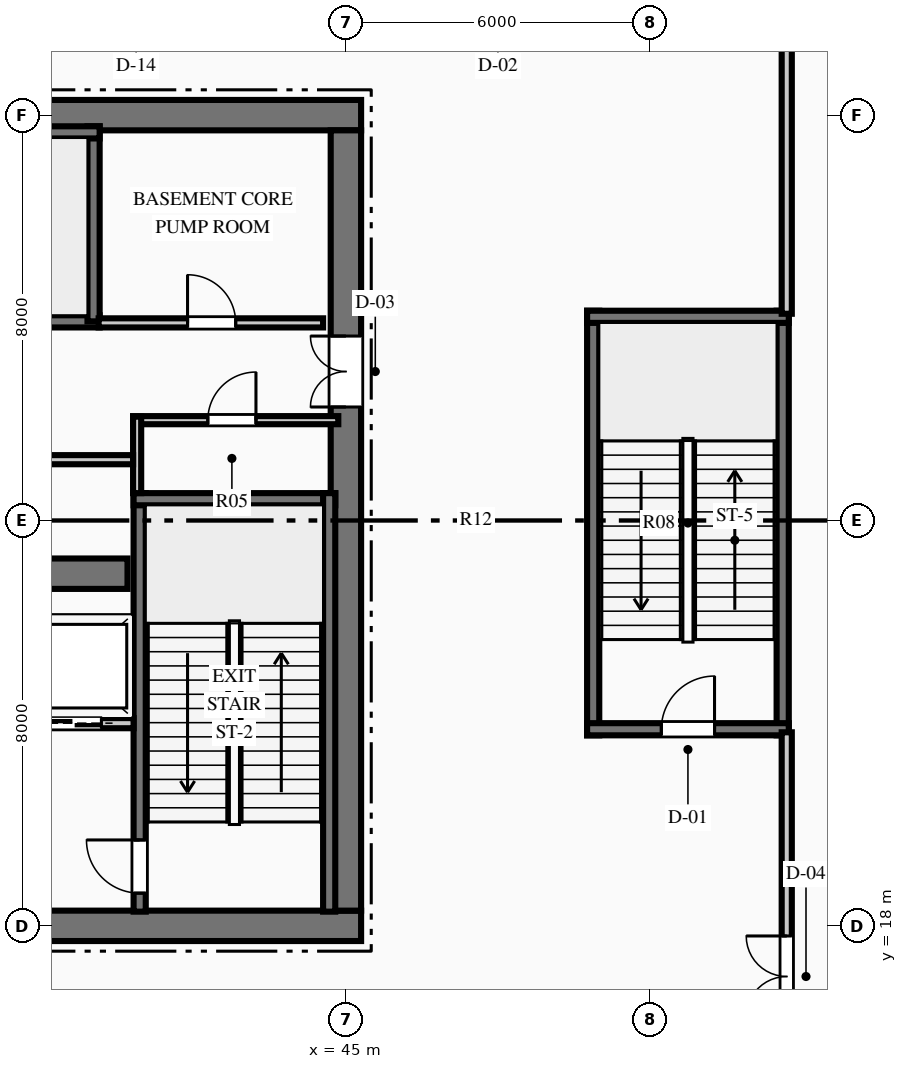
"""IFC4 building model, lengths in metres.
Left out: names, types, materials, properties, quantities, classifications, styles, units other than length and angle.
Written with IfcOpenShell. Run it as: python <this file> out.ifc"""

import sys

from ifc_helpers import new_model, si_unit, direction, frame, frame_2d, origin, place, context, subcontext, project, spatial, rectangle, extrude, element, fill, save


model = new_model("IFC4")
c1 = context("Model", 3, precision=1e-05, world=origin(), true_north=direction((0.0, 1.0)))
c2 = subcontext(c1, "Body", "Model", "MODEL_VIEW")
j1 = project(units=[si_unit("LENGTHUNIT", "METRE"), si_unit("PLANEANGLEUNIT", "RADIAN")], contexts=[c1])
p1 = place(None, origin())
s1 = spatial("IfcSite", under=j1, at=p1, CompositionType="ELEMENT")
p2 = place(p1, origin())
s2 = spatial("IfcBuilding", under=s1, at=p2, CompositionType="ELEMENT")
p3 = place(p2, frame((0.0, 0.0, -5.2)))
s3 = spatial("IfcBuildingStorey", under=s2, at=p3, CompositionType="ELEMENT", Elevation=-5.2)
p4 = place(p3, frame((26.7, 18.0, -0.3), z_axis=(0.0, 0.0, 1.0), x_axis=(1.0, 0.0, 0.0)))
e1 = element("IfcWall", 1, at=p4, inside=s3, PredefinedType="SHEAR", context=c2, shape_type="SweptSolid", body=[
    extrude(rectangle(XDim=18.6, YDim=0.6, at=frame_2d((9.3, 0.0))), origin(), (0.0, 0.0, 1.0), 5.5),
])
p5 = place(p4, frame((7.4, 0.0, 0.3)))
e2 = element("IfcOpeningElement", 2, at=p5, cuts=e1, PredefinedType="OPENING", context=c2, shape_type="SweptSolid", body=[
    extrude(rectangle(XDim=1.1, YDim=2.15, at=frame_2d((0.55, 1.075))), frame((0.0, 0.31, 0.0), z_axis=(0.0, -1.0, 0.0), x_axis=(1.0, 0.0, 0.0)), (0.0, 0.0, 1.0), 0.62),
])
p6 = place(p4, frame((10.1, 0.0, 0.3)))
e3 = element("IfcOpeningElement", 3, at=p6, cuts=e1, PredefinedType="OPENING", context=c2, shape_type="SweptSolid", body=[
    extrude(rectangle(XDim=1.1, YDim=2.15, at=frame_2d((0.55, 1.075))), frame((0.0, 0.31, 0.0), z_axis=(0.0, -1.0, 0.0), x_axis=(1.0, 0.0, 0.0)), (0.0, 0.0, 1.0), 0.62),
])
p7 = place(p3, frame((26.7, 34.0, -0.3), z_axis=(0.0, 0.0, 1.0), x_axis=(1.0, 0.0, 0.0)))
e4 = element("IfcWall", 4, at=p7, inside=s3, PredefinedType="SHEAR", context=c2, shape_type="SweptSolid", body=[
    extrude(rectangle(XDim=18.6, YDim=0.6, at=frame_2d((9.3, 0.0))), origin(), (0.0, 0.0, 1.0), 5.5),
])
p8 = place(p7, frame((1.265, 0.0, 0.3)))
e5 = element("IfcOpeningElement", 5, at=p8, cuts=e4, PredefinedType="OPENING", context=c2, shape_type="SweptSolid", body=[
    extrude(rectangle(XDim=1.1, YDim=2.15, at=frame_2d((0.55, 1.075))), frame((0.0, 0.31, 0.0), z_axis=(0.0, -1.0, 0.0), x_axis=(1.0, 0.0, 0.0)), (0.0, 0.0, 1.0), 0.62),
])
p9 = place(p7, frame((3.515, 0.0, 0.3)))
e6 = element("IfcOpeningElement", 6, at=p9, cuts=e4, PredefinedType="OPENING", context=c2, shape_type="SweptSolid", body=[
    extrude(rectangle(XDim=1.1, YDim=2.15, at=frame_2d((0.55, 1.075))), frame((0.0, 0.31, 0.0), z_axis=(0.0, -1.0, 0.0), x_axis=(1.0, 0.0, 0.0)), (0.0, 0.0, 1.0), 0.62),
])
p10 = place(p3, frame((45.0, 18.3, -0.3), z_axis=(0.0, 0.0, 1.0), x_axis=(0.0, 1.0, 0.0)))
e7 = element("IfcWall", 7, at=p10, inside=s3, PredefinedType="SHEAR", context=c2, shape_type="SweptSolid", body=[
    extrude(rectangle(XDim=15.4, YDim=0.6, at=frame_2d((7.7, 0.0))), origin(), (0.0, 0.0, 1.0), 5.5),
])
p11 = place(p10, frame((9.94, 0.0, 0.3)))
e8 = element("IfcOpeningElement", 8, at=p11, cuts=e7, PredefinedType="OPENING", context=c2, shape_type="SweptSolid", body=[
    extrude(rectangle(XDim=1.4, YDim=2.2, at=frame_2d((0.7, 1.1))), frame((0.0, 0.31, 0.0), z_axis=(0.0, -1.0, 0.0), x_axis=(1.0, 0.0, 0.0)), (0.0, 0.0, 1.0), 0.62),
])
p12 = place(p3, frame((31.31, 24.95, -0.3), z_axis=(0.0, 0.0, 1.0), x_axis=(1.0, 0.0, 0.0)))
e9 = element("IfcWall", 9, at=p12, inside=s3, PredefinedType="SHEAR", context=c2, shape_type="SweptSolid", body=[
    extrude(rectangle(XDim=9.38, YDim=0.6, at=frame_2d((4.69, 0.0))), origin(), (0.0, 0.0, 1.0), 5.5),
])
p13 = place(p3, frame((40.93, 18.28, -0.3), z_axis=(0.0, 0.0, 1.0), x_axis=(0.0, 1.0, 0.0)))
e10 = element("IfcWall", 10, at=p13, inside=s3, PredefinedType="SHEAR", context=c2, shape_type="SweptSolid", body=[
    extrude(rectangle(XDim=8.26, YDim=0.24, at=frame_2d((4.13, 0.0))), origin(), (0.0, 0.0, 1.0), 5.5),
])
p14 = place(p13, frame((0.365, 0.0, 0.3)))
e11 = element("IfcOpeningElement", 11, at=p14, cuts=e10, PredefinedType="OPENING", context=c2, shape_type="SweptSolid", body=[
    extrude(rectangle(XDim=1.05, YDim=2.15, at=frame_2d((0.525, 1.075))), frame((0.0, 0.13, 0.0), z_axis=(0.0, -1.0, 0.0), x_axis=(1.0, 0.0, 0.0)), (0.0, 0.0, 1.0), 0.26),
])
p15 = place(p3, frame((40.81, 26.42, -0.3), z_axis=(0.0, 0.0, 1.0), x_axis=(1.0, 0.0, 0.0)))
e12 = element("IfcWall", 12, at=p15, inside=s3, PredefinedType="SHEAR", context=c2, shape_type="SweptSolid", body=[
    extrude(rectangle(XDim=3.98, YDim=0.24, at=frame_2d((1.99, 0.0))), origin(), (0.0, 0.0, 1.0), 5.5),
])
p16 = place(p3, frame((44.67, 18.28, -0.3), z_axis=(0.0, 0.0, 1.0), x_axis=(0.0, 1.0, 0.0)))
e13 = element("IfcWall", 13, at=p16, inside=s3, PredefinedType="SHEAR", context=c2, shape_type="SweptSolid", body=[
    extrude(rectangle(XDim=8.26, YDim=0.24, at=frame_2d((4.13, 0.0))), origin(), (0.0, 0.0, 1.0), 5.5),
])
p17 = place(p3, frame((31.76, 29.93, -0.3), z_axis=(0.0, 0.0, 1.0), x_axis=(1.0, 0.0, 0.0)))
e14 = element("IfcWall", 14, at=p17, inside=s3, PredefinedType="SHEAR", context=c2, shape_type="SweptSolid", body=[
    extrude(rectangle(XDim=8.38, YDim=0.24, at=frame_2d((4.19, 0.0))), origin(), (0.0, 0.0, 1.0), 5.5),
])
p18 = place(p17, frame((0.565, 0.0, 0.3)))
e15 = element("IfcOpeningElement", 15, at=p18, cuts=e14, PredefinedType="OPENING", context=c2, shape_type="SweptSolid", body=[
    extrude(rectangle(XDim=1.05, YDim=2.15, at=frame_2d((0.525, 1.075))), frame((0.0, 0.13, 0.0), z_axis=(0.0, -1.0, 0.0), x_axis=(1.0, 0.0, 0.0)), (0.0, 0.0, 1.0), 0.26),
])
p19 = place(p3, frame((40.02, 29.93, -0.3), z_axis=(0.0, 0.0, 1.0), x_axis=(0.0, 1.0, 0.0)))
e16 = element("IfcWall", 16, at=p19, inside=s3, PredefinedType="SHEAR", context=c2, shape_type="SweptSolid", body=[
    extrude(rectangle(XDim=3.85, YDim=0.24, at=frame_2d((1.925, 0.0))), origin(), (0.0, 0.0, 1.0), 5.5),
])
p20 = place(p3, frame((37.85, 33.66, -0.3), z_axis=(0.0, 0.0, 1.0), x_axis=(1.0, 0.0, 0.0)))
e17 = element("IfcWall", 17, at=p20, inside=s3, PredefinedType="SHEAR", context=c2, shape_type="SweptSolid", body=[
    extrude(rectangle(XDim=2.29, YDim=0.24, at=frame_2d((1.145, 0.0))), origin(), (0.0, 0.0, 1.0), 5.5),
])
for number, where, z_axis, x_axis in (
    (18, (49.88, 21.76, -0.3), (0.0, 0.0, 1.0), (0.0, 1.0, 0.0)),
    (19, (53.62, 21.76, -0.3), (0.0, 0.0, 1.0), (0.0, 1.0, 0.0)),
):
    element("IfcWall", number, at=place(p3, frame(where, z_axis=z_axis, x_axis=x_axis)), inside=s3, PredefinedType="SHEAR", context=c2, shape_type="SweptSolid", body=[
        extrude(rectangle(XDim=8.38, YDim=0.24, at=frame_2d((4.19, 0.0))), origin(), (0.0, 0.0, 1.0), 5.5),
    ])
p21 = place(p3, frame((49.76, 21.88, -0.3), z_axis=(0.0, 0.0, 1.0), x_axis=(1.0, 0.0, 0.0)))
e20 = element("IfcWall", 20, at=p21, inside=s3, PredefinedType="SHEAR", context=c2, shape_type="SweptSolid", body=[
    extrude(rectangle(XDim=3.98, YDim=0.24, at=frame_2d((1.99, 0.0))), origin(), (0.0, 0.0, 1.0), 5.5),
])
p22 = place(p21, frame((1.465, 0.0, 0.3)))
e21 = element("IfcOpeningElement", 21, at=p22, cuts=e20, PredefinedType="OPENING", context=c2, shape_type="SweptSolid", body=[
    extrude(rectangle(XDim=1.05, YDim=2.15, at=frame_2d((0.525, 1.075))), frame((0.0, 0.13, 0.0), z_axis=(0.0, -1.0, 0.0), x_axis=(1.0, 0.0, 0.0)), (0.0, 0.0, 1.0), 0.26),
])
p23 = place(p3, frame((49.76, 30.02, -0.3), z_axis=(0.0, 0.0, 1.0), x_axis=(1.0, 0.0, 0.0)))
e22 = element("IfcWall", 22, at=p23, inside=s3, PredefinedType="SHEAR", context=c2, shape_type="SweptSolid", body=[
    extrude(rectangle(XDim=3.98, YDim=0.24, at=frame_2d((1.99, 0.0))), origin(), (0.0, 0.0, 1.0), 5.5),
])
p24 = place(p3, frame((36.12, 22.0, 0.0), z_axis=(0.0, 0.0, 1.0), x_axis=(1.0, 0.0, 0.0)))
e23 = element("IfcWall", 23, at=p24, inside=s3, PredefinedType="PARTITIONING", context=c2, shape_type="SweptSolid", body=[
    extrude(rectangle(XDim=4.69, YDim=0.2, at=frame_2d((2.345, 0.0))), origin(), (0.0, 0.0, 1.0), 4.84),
])
p25 = place(p24, frame((2.955, 0.0, 0.0)))
e24 = element("IfcOpeningElement", 24, at=p25, cuts=e23, PredefinedType="OPENING", context=c2, shape_type="SweptSolid", body=[
    extrude(rectangle(XDim=1.1, YDim=2.15, at=frame_2d((0.55, 1.075))), frame((0.0, 0.11, 0.0), z_axis=(0.0, -1.0, 0.0), x_axis=(1.0, 0.0, 0.0)), (0.0, 0.0, 1.0), 0.22),
])
p26 = place(p24, frame((0.08, 0.0, 0.0)))
e25 = element("IfcOpeningElement", 25, at=p26, cuts=e23, PredefinedType="OPENING", context=c2, shape_type="SweptSolid", body=[
    extrude(rectangle(XDim=1.4, YDim=2.2, at=frame_2d((0.7, 1.1))), frame((0.0, 0.11, 0.0), z_axis=(0.0, -1.0, 0.0), x_axis=(1.0, 0.0, 0.0)), (0.0, 0.0, 1.0), 0.22),
])
p27 = place(p3, frame((40.8, 27.98, 0.0), z_axis=(0.0, 0.0, 1.0), x_axis=(1.0, 0.0, 0.0)))
e26 = element("IfcWall", 26, at=p27, inside=s3, PredefinedType="PARTITIONING", context=c2, shape_type="SweptSolid", body=[
    extrude(rectangle(XDim=4.05, YDim=0.16, at=frame_2d((2.025, 0.0))), origin(), (0.0, 0.0, 1.0), 4.84),
])
p28 = place(p27, frame((1.475, 0.0, 0.0)))
e27 = element("IfcOpeningElement", 27, at=p28, cuts=e26, PredefinedType="OPENING", context=c2, shape_type="SweptSolid", body=[
    extrude(rectangle(XDim=0.95, YDim=2.15, at=frame_2d((0.475, 1.075))), frame((0.0, 0.09, 0.0), z_axis=(0.0, -1.0, 0.0), x_axis=(1.0, 0.0, 0.0)), (0.0, 0.0, 1.0), 0.18),
])
p29 = place(p3, frame((40.88, 26.54, 0.0), z_axis=(0.0, 0.0, 1.0), x_axis=(0.0, 1.0, 0.0)))
e28 = element("IfcWall", 28, at=p29, inside=s3, PredefinedType="PARTITIONING", context=c2, shape_type="SweptSolid", body=[
    extrude(rectangle(XDim=1.51, YDim=0.16, at=frame_2d((0.755, 0.0))), origin(), (0.0, 0.0, 1.0), 4.84),
])
p30 = place(p3, frame((40.12, 29.9, 0.0), z_axis=(0.0, 0.0, 1.0), x_axis=(1.0, 0.0, 0.0)))
e29 = element("IfcWall", 29, at=p30, inside=s3, PredefinedType="PARTITIONING", context=c2, shape_type="SweptSolid", body=[
    extrude(rectangle(XDim=4.43, YDim=0.18, at=frame_2d((2.215, 0.0))), origin(), (0.0, 0.0, 1.0), 4.84),
])
p31 = place(p30, frame((1.755, 0.0, 0.0)))
e30 = element("IfcOpeningElement", 30, at=p31, cuts=e29, PredefinedType="OPENING", context=c2, shape_type="SweptSolid", body=[
    extrude(rectangle(XDim=0.95, YDim=2.15, at=frame_2d((0.475, 1.075))), frame((0.0, 0.1, 0.0), z_axis=(0.0, -1.0, 0.0), x_axis=(1.0, 0.0, 0.0)), (0.0, 0.0, 1.0), 0.2),
])
p32 = place(p3, frame((31.2, 27.2, 0.0), z_axis=(0.0, 0.0, 1.0), x_axis=(1.0, 0.0, 0.0)))
e31 = element("IfcWall", 31, at=p32, inside=s3, PredefinedType="PARTITIONING", context=c2, shape_type="SweptSolid", body=[
    extrude(rectangle(XDim=9.6, YDim=0.18, at=frame_2d((4.8, 0.0))), origin(), (0.0, 0.0, 1.0), 4.84),
])
p33 = place(p32, frame((4.325, 0.0, 0.0)))
e32 = element("IfcOpeningElement", 32, at=p33, cuts=e31, PredefinedType="OPENING", context=c2, shape_type="SweptSolid", body=[
    extrude(rectangle(XDim=0.95, YDim=2.15, at=frame_2d((0.475, 1.075))), frame((0.0, 0.1, 0.0), z_axis=(0.0, -1.0, 0.0), x_axis=(1.0, 0.0, 0.0)), (0.0, 0.0, 1.0), 0.2),
])
p34 = place(p3, frame((53.7, 15.3, 0.0), z_axis=(0.0, 0.0, 1.0), x_axis=(0.0, 1.0, 0.0)))
e33 = element("IfcWall", 33, at=p34, inside=s3, PredefinedType="PARTITIONING", context=c2, shape_type="SweptSolid", body=[
    extrude(rectangle(XDim=6.52, YDim=0.2, at=frame_2d((3.26, 0.0))), origin(), (0.0, 0.0, 1.0), 4.84),
])
p35 = place(p34, frame((0.9, 0.0, 0.0)))
e34 = element("IfcOpeningElement", 34, at=p35, cuts=e33, PredefinedType="OPENING", context=c2, shape_type="SweptSolid", body=[
    extrude(rectangle(XDim=1.6, YDim=2.2, at=frame_2d((0.8, 1.1))), frame((0.0, 0.11, 0.0), z_axis=(0.0, -1.0, 0.0), x_axis=(1.0, 0.0, 0.0)), (0.0, 0.0, 1.0), 0.22),
])
p36 = place(p3, frame((53.7, 30.08, 0.0), z_axis=(0.0, 0.0, 1.0), x_axis=(0.0, 1.0, 0.0)))
e35 = element("IfcWall", 35, at=p36, inside=s3, PredefinedType="PARTITIONING", context=c2, shape_type="SweptSolid", body=[
    extrude(rectangle(XDim=6.62, YDim=0.2, at=frame_2d((3.31, 0.0))), origin(), (0.0, 0.0, 1.0), 4.84),
])
p37 = place(p28, origin())
e36 = element("IfcDoor", 36, at=p37, inside=s3, OperationType="SINGLE_SWING_RIGHT", PredefinedType="DOOR", context=c2, shape_type="SweptSolid", body=[
    extrude(rectangle(XDim=0.95, YDim=2.15, at=frame_2d((0.475, 1.075))), frame((0.0, 0.025, 0.0), z_axis=(0.0, -1.0, 0.0), x_axis=(1.0, 0.0, 0.0)), (0.0, 0.0, 1.0), 0.05),
])
fill(e27, e36)
p38 = place(p31, origin())
e37 = element("IfcDoor", 37, at=p38, inside=s3, OperationType="SINGLE_SWING_LEFT", PredefinedType="DOOR", context=c2, shape_type="SweptSolid", body=[
    extrude(rectangle(XDim=0.95, YDim=2.15, at=frame_2d((0.475, 1.075))), frame((0.0, 0.025, 0.0), z_axis=(0.0, -1.0, 0.0), x_axis=(1.0, 0.0, 0.0)), (0.0, 0.0, 1.0), 0.05),
])
fill(e30, e37)
p39 = place(p14, origin())
e38 = element("IfcDoor", 38, at=p39, inside=s3, OperationType="SINGLE_SWING_RIGHT", PredefinedType="DOOR", context=c2, shape_type="SweptSolid", body=[
    extrude(rectangle(XDim=1.05, YDim=2.15, at=frame_2d((0.525, 1.075))), frame((0.0, 0.025, 0.0), z_axis=(0.0, -1.0, 0.0), x_axis=(1.0, 0.0, 0.0)), (0.0, 0.0, 1.0), 0.05),
])
fill(e11, e38)
p40 = place(p11, origin())
e39 = element("IfcDoor", 39, at=p40, inside=s3, OperationType="DOUBLE_DOOR_SINGLE_SWING", PredefinedType="DOOR", context=c2, shape_type="SweptSolid", body=[
    extrude(rectangle(XDim=1.4, YDim=2.2, at=frame_2d((0.7, 1.1))), frame((0.0, 0.025, 0.0), z_axis=(0.0, -1.0, 0.0), x_axis=(1.0, 0.0, 0.0)), (0.0, 0.0, 1.0), 0.05),
])
fill(e8, e39)
p41 = place(p22, origin())
e40 = element("IfcDoor", 40, at=p41, inside=s3, OperationType="SINGLE_SWING_RIGHT", PredefinedType="DOOR", context=c2, shape_type="SweptSolid", body=[
    extrude(rectangle(XDim=1.05, YDim=2.15, at=frame_2d((0.525, 1.075))), frame((0.0, 0.025, 0.0), z_axis=(0.0, -1.0, 0.0), x_axis=(1.0, 0.0, 0.0)), (0.0, 0.0, 1.0), 0.05),
])
fill(e21, e40)
p42 = place(p35, origin())
e41 = element("IfcDoor", 41, at=p42, inside=s3, OperationType="DOUBLE_DOOR_SINGLE_SWING", PredefinedType="DOOR", context=c2, shape_type="SweptSolid", body=[
    extrude(rectangle(XDim=1.6, YDim=2.2, at=frame_2d((0.8, 1.1))), frame((0.0, 0.025, 0.0), z_axis=(0.0, -1.0, 0.0), x_axis=(1.0, 0.0, 0.0)), (0.0, 0.0, 1.0), 0.05),
])
fill(e34, e41)
p43 = place(p25, origin())
e42 = element("IfcDoor", 42, at=p43, inside=s3, OperationType="SLIDING_TO_LEFT", PredefinedType="DOOR", context=c2, shape_type="SweptSolid", body=[
    extrude(rectangle(XDim=1.1, YDim=2.15, at=frame_2d((0.55, 1.075))), frame((0.0, 0.025, 0.0), z_axis=(0.0, -1.0, 0.0), x_axis=(1.0, 0.0, 0.0)), (0.0, 0.0, 1.0), 0.05),
])
fill(e24, e42)
save(model, sys.argv[1])
